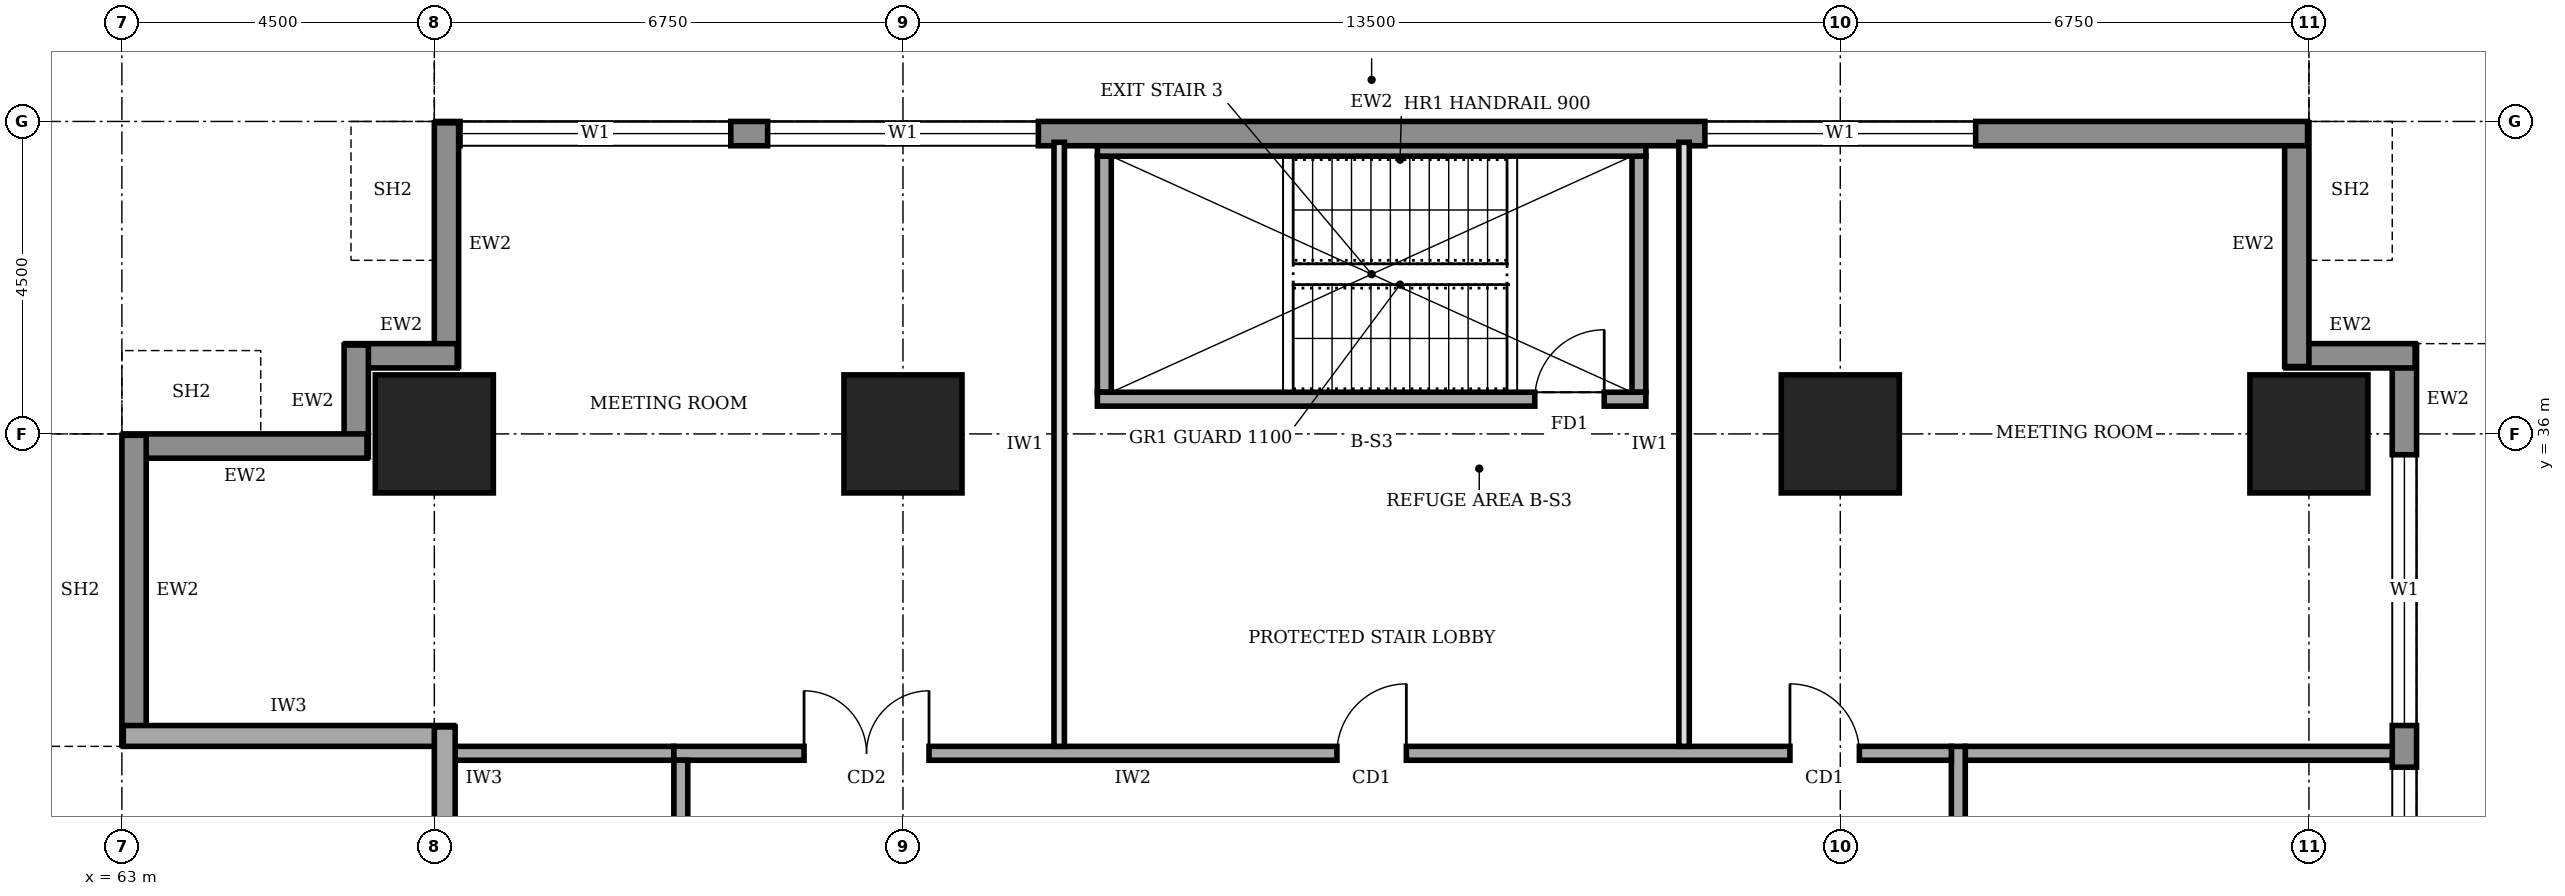
"""IFC4 building model, lengths in metres.
Left out: names, types, materials, properties, quantities, classifications, styles, units other than length and angle.
Written with IfcOpenShell. Run it as: python <this file> out.ifc"""

import sys

from ifc_helpers import new_model, si_unit, direction, frame, frame_2d, origin, origin_2d, place, context, subcontext, project, spatial, rectangle, extrude, element, fill, save


model = new_model("IFC4")
c1 = context("Model", 3, precision=1e-05, world=origin(), true_north=direction((0.0, 1.0)))
c2 = subcontext(c1, "Body", "Model", "MODEL_VIEW")
j1 = project(units=[si_unit("LENGTHUNIT", "METRE"), si_unit("PLANEANGLEUNIT", "RADIAN")], contexts=[c1])
p1 = place(None, origin())
s1 = spatial("IfcSite", under=j1, at=p1, CompositionType="ELEMENT")
p2 = place(p1, origin())
s2 = spatial("IfcBuilding", under=s1, at=p2, CompositionType="ELEMENT")
p3 = place(p2, frame((0.0, 0.0, 125.0)))
s3 = spatial("IfcBuildingStorey", under=s2, at=p3, CompositionType="ELEMENT", Elevation=125.0)
for number, where, z_axis, x_axis in (
    (1, (67.5, 36.0, 0.0), (0.0, 0.0, 1.0), (1.0, 0.0, 0.0)),
    (2, (74.25, 36.0, 0.0), (0.0, 0.0, 1.0), (1.0, 0.0, 0.0)),
    (3, (87.75, 36.0, 0.0), (0.0, 0.0, 1.0), (1.0, 0.0, 0.0)),
    (4, (94.5, 36.0, 0.0), (0.0, 0.0, 1.0), (1.0, 0.0, 0.0)),
):
    element("IfcColumn", number, at=place(p3, frame(where, z_axis=z_axis, x_axis=x_axis)), inside=s3, PredefinedType="COLUMN", context=c2, shape_type="SweptSolid", body=[
        extrude(rectangle(XDim=1.7, YDim=1.7, at=origin_2d()), origin(), (0.0, 0.0, 1.0), 4.0),
    ])
p4 = place(p3, frame((95.875, 3.32, 0.0), z_axis=(0.0, 0.0, 1.0), x_axis=(0.0, 1.0, 0.0)))
e5 = element("IfcWall", 5, at=p4, inside=s3, PredefinedType="STANDARD", context=c2, shape_type="SweptSolid", body=[
    extrude(rectangle(XDim=33.96, YDim=0.35, at=frame_2d((16.98, 0.0))), origin(), (0.0, 0.0, 1.0), 3.75),
])
p5 = place(p4, frame((1.48, 0.0, 0.9)))
e6 = element("IfcOpeningElement", 6, at=p5, cuts=e5, PredefinedType="OPENING", context=c2, shape_type="SweptSolid", body=[
    extrude(rectangle(XDim=3.9, YDim=2.2, at=frame_2d((1.95, 1.1))), frame((0.0, 0.185, 0.0), z_axis=(0.0, -1.0, 0.0), x_axis=(1.0, 0.0, 0.0)), (0.0, 0.0, 1.0), 0.37),
])
p6 = place(p4, frame((5.98, 0.0, 0.9)))
e7 = element("IfcOpeningElement", 7, at=p6, cuts=e5, PredefinedType="OPENING", context=c2, shape_type="SweptSolid", body=[
    extrude(rectangle(XDim=3.9, YDim=2.2, at=frame_2d((1.95, 1.1))), frame((0.0, 0.185, 0.0), z_axis=(0.0, -1.0, 0.0), x_axis=(1.0, 0.0, 0.0)), (0.0, 0.0, 1.0), 0.37),
])
p7 = place(p4, frame((10.48, 0.0, 0.9)))
e8 = element("IfcOpeningElement", 8, at=p7, cuts=e5, PredefinedType="OPENING", context=c2, shape_type="SweptSolid", body=[
    extrude(rectangle(XDim=3.9, YDim=2.2, at=frame_2d((1.95, 1.1))), frame((0.0, 0.185, 0.0), z_axis=(0.0, -1.0, 0.0), x_axis=(1.0, 0.0, 0.0)), (0.0, 0.0, 1.0), 0.37),
])
p8 = place(p4, frame((14.98, 0.0, 0.9)))
e9 = element("IfcOpeningElement", 9, at=p8, cuts=e5, PredefinedType="OPENING", context=c2, shape_type="SweptSolid", body=[
    extrude(rectangle(XDim=3.9, YDim=2.2, at=frame_2d((1.95, 1.1))), frame((0.0, 0.185, 0.0), z_axis=(0.0, -1.0, 0.0), x_axis=(1.0, 0.0, 0.0)), (0.0, 0.0, 1.0), 0.37),
])
p9 = place(p4, frame((19.48, 0.0, 0.9)))
e10 = element("IfcOpeningElement", 10, at=p9, cuts=e5, PredefinedType="OPENING", context=c2, shape_type="SweptSolid", body=[
    extrude(rectangle(XDim=3.9, YDim=2.2, at=frame_2d((1.95, 1.1))), frame((0.0, 0.185, 0.0), z_axis=(0.0, -1.0, 0.0), x_axis=(1.0, 0.0, 0.0)), (0.0, 0.0, 1.0), 0.37),
])
p10 = place(p4, frame((23.98, 0.0, 0.9)))
e11 = element("IfcOpeningElement", 11, at=p10, cuts=e5, PredefinedType="OPENING", context=c2, shape_type="SweptSolid", body=[
    extrude(rectangle(XDim=3.9, YDim=2.2, at=frame_2d((1.95, 1.1))), frame((0.0, 0.185, 0.0), z_axis=(0.0, -1.0, 0.0), x_axis=(1.0, 0.0, 0.0)), (0.0, 0.0, 1.0), 0.37),
])
p11 = place(p4, frame((28.48, 0.0, 0.9)))
e12 = element("IfcOpeningElement", 12, at=p11, cuts=e5, PredefinedType="OPENING", context=c2, shape_type="SweptSolid", body=[
    extrude(rectangle(XDim=3.9, YDim=2.2, at=frame_2d((1.95, 1.1))), frame((0.0, 0.185, 0.0), z_axis=(0.0, -1.0, 0.0), x_axis=(1.0, 0.0, 0.0)), (0.0, 0.0, 1.0), 0.37),
])
p12 = place(p3, frame((96.03, 37.125, 0.0), z_axis=(0.0, 0.0, 1.0), x_axis=(-1.0, 0.0, 0.0)))
e13 = element("IfcWall", 13, at=p12, inside=s3, PredefinedType="STANDARD", context=c2, shape_type="SweptSolid", body=[
    extrude(rectangle(XDim=1.86, YDim=0.35, at=frame_2d((0.93, 0.0))), origin(), (0.0, 0.0, 1.0), 3.75),
])
p13 = place(p3, frame((94.325, 36.97, 0.0), z_axis=(0.0, 0.0, 1.0), x_axis=(0.0, 1.0, 0.0)))
e14 = element("IfcWall", 14, at=p13, inside=s3, PredefinedType="STANDARD", context=c2, shape_type="SweptSolid", body=[
    extrude(rectangle(XDim=3.51, YDim=0.35, at=frame_2d((1.755, 0.0))), origin(), (0.0, 0.0, 1.0), 2.85),
])
p14 = place(p3, frame((94.48, 40.325, 0.0), z_axis=(0.0, 0.0, 1.0), x_axis=(-1.0, 0.0, 0.0)))
e15 = element("IfcWall", 15, at=p14, inside=s3, PredefinedType="STANDARD", context=c2, shape_type="SweptSolid", body=[
    extrude(rectangle(XDim=26.96, YDim=0.35, at=frame_2d((13.48, 0.0))), origin(), (0.0, 0.0, 1.0), 3.75),
])
p15 = place(p14, frame((22.71, 0.0, 0.9)))
e16 = element("IfcOpeningElement", 16, at=p15, cuts=e15, PredefinedType="OPENING", context=c2, shape_type="SweptSolid", body=[
    extrude(rectangle(XDim=3.9, YDim=2.2, at=frame_2d((1.95, 1.1))), frame((0.0, 0.185, 0.0), z_axis=(0.0, -1.0, 0.0), x_axis=(1.0, 0.0, 0.0)), (0.0, 0.0, 1.0), 0.37),
])
p16 = place(p14, frame((18.28, 0.0, 0.9)))
e17 = element("IfcOpeningElement", 17, at=p16, cuts=e15, PredefinedType="OPENING", context=c2, shape_type="SweptSolid", body=[
    extrude(rectangle(XDim=3.9, YDim=2.2, at=frame_2d((1.95, 1.1))), frame((0.0, 0.185, 0.0), z_axis=(0.0, -1.0, 0.0), x_axis=(1.0, 0.0, 0.0)), (0.0, 0.0, 1.0), 0.37),
])
p17 = place(p14, frame((4.78, 0.0, 0.9)))
e18 = element("IfcOpeningElement", 18, at=p17, cuts=e15, PredefinedType="OPENING", context=c2, shape_type="SweptSolid", body=[
    extrude(rectangle(XDim=3.9, YDim=2.2, at=frame_2d((1.95, 1.1))), frame((0.0, 0.185, 0.0), z_axis=(0.0, -1.0, 0.0), x_axis=(1.0, 0.0, 0.0)), (0.0, 0.0, 1.0), 0.37),
])
p18 = place(p3, frame((67.675, 40.48, 0.0), z_axis=(0.0, 0.0, 1.0), x_axis=(0.0, -1.0, 0.0)))
e19 = element("IfcWall", 19, at=p18, inside=s3, PredefinedType="STANDARD", context=c2, shape_type="SweptSolid", body=[
    extrude(rectangle(XDim=3.51, YDim=0.35, at=frame_2d((1.755, 0.0))), origin(), (0.0, 0.0, 1.0), 2.85),
])
for number, where, z_axis, x_axis in (
    (20, (67.83, 37.125, 0.0), (0.0, 0.0, 1.0), (-1.0, 0.0, 0.0)),
    (21, (66.375, 37.28, 0.0), (0.0, 0.0, 1.0), (0.0, -1.0, 0.0)),
):
    element("IfcWall", number, at=place(p3, frame(where, z_axis=z_axis, x_axis=x_axis)), inside=s3, PredefinedType="STANDARD", context=c2, shape_type="SweptSolid", body=[
        extrude(rectangle(XDim=1.61, YDim=0.35, at=frame_2d((0.805, 0.0))), origin(), (0.0, 0.0, 1.0), 3.75),
    ])
p19 = place(p3, frame((66.53, 35.825, 0.0), z_axis=(0.0, 0.0, 1.0), x_axis=(-1.0, 0.0, 0.0)))
e22 = element("IfcWall", 22, at=p19, inside=s3, PredefinedType="STANDARD", context=c2, shape_type="SweptSolid", body=[
    extrude(rectangle(XDim=3.51, YDim=0.35, at=frame_2d((1.755, 0.0))), origin(), (0.0, 0.0, 1.0), 2.85),
])
p20 = place(p3, frame((63.175, 35.98, 0.0), z_axis=(0.0, 0.0, 1.0), x_axis=(0.0, -1.0, 0.0)))
e23 = element("IfcWall", 23, at=p20, inside=s3, PredefinedType="STANDARD", context=c2, shape_type="SweptSolid", body=[
    extrude(rectangle(XDim=4.46, YDim=0.35, at=frame_2d((2.23, 0.0))), origin(), (0.0, 0.0, 1.0), 3.75),
])
p21 = place(p3, frame((63.02, 31.65, 0.0), z_axis=(0.0, 0.0, 1.0), x_axis=(1.0, 0.0, 0.0)))
e24 = element("IfcWall", 24, at=p21, inside=s3, PredefinedType="SOLIDWALL", context=c2, shape_type="SweptSolid", body=[
    extrude(rectangle(XDim=4.76, YDim=0.3, at=frame_2d((2.38, 0.0))), origin(), (0.0, 0.0, 1.0), 3.75),
])
p22 = place(p3, frame((67.65, 31.78, 0.0), z_axis=(0.0, 0.0, 1.0), x_axis=(0.0, -1.0, 0.0)))
e25 = element("IfcWall", 25, at=p22, inside=s3, PredefinedType="SOLIDWALL", context=c2, shape_type="SweptSolid", body=[
    extrude(rectangle(XDim=1.48, YDim=0.3, at=frame_2d((0.74, 0.0))), origin(), (0.0, 0.0, 1.0), 2.65),
])
p23 = place(p3, frame((89.45, 9.2, 0.0), z_axis=(0.0, 0.0, 1.0), x_axis=(0.0, 1.0, 0.0)))
e26 = element("IfcWall", 26, at=p23, inside=s3, PredefinedType="SOLIDWALL", context=c2, shape_type="SweptSolid", body=[
    extrude(rectangle(XDim=22.3, YDim=0.2, at=frame_2d((11.15, 0.0))), origin(), (0.0, 0.0, 1.0), 3.75),
])
p24 = place(p23, frame((1.625, 0.0, 0.0)))
e27 = element("IfcOpeningElement", 27, at=p24, cuts=e26, PredefinedType="OPENING", context=c2, shape_type="SweptSolid", body=[
    extrude(rectangle(XDim=1.0, YDim=2.1, at=frame_2d((0.5, 1.05))), frame((0.0, 0.11, 0.0), z_axis=(0.0, -1.0, 0.0), x_axis=(1.0, 0.0, 0.0)), (0.0, 0.0, 1.0), 0.22),
])
p25 = place(p23, frame((5.825, 0.0, 0.0)))
e28 = element("IfcOpeningElement", 28, at=p25, cuts=e26, PredefinedType="OPENING", context=c2, shape_type="SweptSolid", body=[
    extrude(rectangle(XDim=0.9, YDim=2.1, at=frame_2d((0.45, 1.05))), frame((0.0, 0.11, 0.0), z_axis=(0.0, -1.0, 0.0), x_axis=(1.0, 0.0, 0.0)), (0.0, 0.0, 1.0), 0.22),
])
p26 = place(p23, frame((8.75, 0.0, 0.0)))
e29 = element("IfcOpeningElement", 29, at=p26, cuts=e26, PredefinedType="OPENING", context=c2, shape_type="SweptSolid", body=[
    extrude(rectangle(XDim=0.9, YDim=2.1, at=frame_2d((0.45, 1.05))), frame((0.0, 0.11, 0.0), z_axis=(0.0, -1.0, 0.0), x_axis=(1.0, 0.0, 0.0)), (0.0, 0.0, 1.0), 0.22),
])
p27 = place(p23, frame((13.525, 0.0, 0.0)))
e30 = element("IfcOpeningElement", 30, at=p27, cuts=e26, PredefinedType="OPENING", context=c2, shape_type="SweptSolid", body=[
    extrude(rectangle(XDim=0.9, YDim=2.1, at=frame_2d((0.45, 1.05))), frame((0.0, 0.11, 0.0), z_axis=(0.0, -1.0, 0.0), x_axis=(1.0, 0.0, 0.0)), (0.0, 0.0, 1.0), 0.22),
])
p28 = place(p23, frame((16.15, 0.0, 0.0)))
e31 = element("IfcOpeningElement", 31, at=p28, cuts=e26, PredefinedType="OPENING", context=c2, shape_type="SweptSolid", body=[
    extrude(rectangle(XDim=1.0, YDim=2.1, at=frame_2d((0.5, 1.05))), frame((0.0, 0.11, 0.0), z_axis=(0.0, -1.0, 0.0), x_axis=(1.0, 0.0, 0.0)), (0.0, 0.0, 1.0), 0.22),
])
p29 = place(p23, frame((10.8, 0.0, 0.0)))
e32 = element("IfcOpeningElement", 32, at=p29, cuts=e26, PredefinedType="OPENING", context=c2, shape_type="SweptSolid", body=[
    extrude(rectangle(XDim=1.0, YDim=2.1, at=frame_2d((0.5, 1.05))), frame((0.0, 0.11, 0.0), z_axis=(0.0, -1.0, 0.0), x_axis=(1.0, 0.0, 0.0)), (0.0, 0.0, 1.0), 0.22),
])
p30 = place(p23, frame((19.475, 0.0, 0.0)))
e33 = element("IfcOpeningElement", 33, at=p30, cuts=e26, PredefinedType="OPENING", context=c2, shape_type="SweptSolid", body=[
    extrude(rectangle(XDim=1.0, YDim=2.1, at=frame_2d((0.5, 1.05))), frame((0.0, 0.11, 0.0), z_axis=(0.0, -1.0, 0.0), x_axis=(1.0, 0.0, 0.0)), (0.0, 0.0, 1.0), 0.22),
])
p31 = place(p3, frame((89.35, 31.4, 0.0), z_axis=(0.0, 0.0, 1.0), x_axis=(-1.0, 0.0, 0.0)))
e34 = element("IfcWall", 34, at=p31, inside=s3, PredefinedType="SOLIDWALL", context=c2, shape_type="SweptSolid", body=[
    extrude(rectangle(XDim=18.4, YDim=0.2, at=frame_2d((9.2, 0.0))), origin(), (0.0, 0.0, 1.0), 3.75),
])
p32 = place(p31, frame((14.725, 0.0, 0.0)))
e35 = element("IfcOpeningElement", 35, at=p32, cuts=e34, PredefinedType="OPENING", context=c2, shape_type="SweptSolid", body=[
    extrude(rectangle(XDim=1.8, YDim=2.1, at=frame_2d((0.9, 1.05))), frame((0.0, 0.11, 0.0), z_axis=(0.0, -1.0, 0.0), x_axis=(1.0, 0.0, 0.0)), (0.0, 0.0, 1.0), 0.22),
])
p33 = place(p31, frame((7.85, 0.0, 0.0)))
e36 = element("IfcOpeningElement", 36, at=p33, cuts=e34, PredefinedType="OPENING", context=c2, shape_type="SweptSolid", body=[
    extrude(rectangle(XDim=1.0, YDim=2.1, at=frame_2d((0.5, 1.05))), frame((0.0, 0.11, 0.0), z_axis=(0.0, -1.0, 0.0), x_axis=(1.0, 0.0, 0.0)), (0.0, 0.0, 1.0), 0.22),
])
p34 = place(p31, frame((1.325, 0.0, 0.0)))
e37 = element("IfcOpeningElement", 37, at=p34, cuts=e34, PredefinedType="OPENING", context=c2, shape_type="SweptSolid", body=[
    extrude(rectangle(XDim=1.0, YDim=2.1, at=frame_2d((0.5, 1.05))), frame((0.0, 0.11, 0.0), z_axis=(0.0, -1.0, 0.0), x_axis=(1.0, 0.0, 0.0)), (0.0, 0.0, 1.0), 0.22),
])
p35 = place(p3, frame((71.05, 31.3, 0.0), z_axis=(0.0, 0.0, 1.0), x_axis=(0.0, -1.0, 0.0)))
e38 = element("IfcWall", 38, at=p35, inside=s3, PredefinedType="SOLIDWALL", context=c2, shape_type="SweptSolid", body=[
    extrude(rectangle(XDim=22.3, YDim=0.2, at=frame_2d((11.15, 0.0))), origin(), (0.0, 0.0, 1.0), 3.75),
])
p36 = place(p35, frame((10.15, 0.0, 0.0)))
e39 = element("IfcOpeningElement", 39, at=p36, cuts=e38, PredefinedType="OPENING", context=c2, shape_type="SweptSolid", body=[
    extrude(rectangle(XDim=1.8, YDim=2.1, at=frame_2d((0.9, 1.05))), frame((0.0, 0.11, 0.0), z_axis=(0.0, -1.0, 0.0), x_axis=(1.0, 0.0, 0.0)), (0.0, 0.0, 1.0), 0.22),
])
p37 = place(p3, frame((67.8, 31.4, 0.0), z_axis=(0.0, 0.0, 1.0), x_axis=(1.0, 0.0, 0.0)))
e40 = element("IfcWall", 40, at=p37, inside=s3, PredefinedType="SOLIDWALL", context=c2, shape_type="SweptSolid", body=[
    extrude(rectangle(XDim=3.15, YDim=0.2, at=frame_2d((1.575, 0.0))), origin(), (0.0, 0.0, 1.0), 3.75),
])
p38 = place(p3, frame((89.55, 31.4, 0.0), z_axis=(0.0, 0.0, 1.0), x_axis=(1.0, 0.0, 0.0)))
e41 = element("IfcWall", 41, at=p38, inside=s3, PredefinedType="SOLIDWALL", context=c2, shape_type="SweptSolid", body=[
    extrude(rectangle(XDim=6.2, YDim=0.2, at=frame_2d((3.1, 0.0))), origin(), (0.0, 0.0, 1.0), 3.75),
])
for number, where, z_axis, x_axis in (
    (42, (76.5, 31.5, 0.0), (0.0, 0.0, 1.0), (0.0, 1.0, 0.0)),
    (43, (85.5, 31.5, 0.0), (0.0, 0.0, 1.0), (0.0, 1.0, 0.0)),
):
    element("IfcWall", number, at=place(p3, frame(where, z_axis=z_axis, x_axis=x_axis)), inside=s3, PredefinedType="PARTITIONING", context=c2, shape_type="SweptSolid", body=[
        extrude(rectangle(XDim=8.7, YDim=0.15, at=frame_2d((4.35, 0.0))), origin(), (0.0, 0.0, 1.0), 3.75),
    ])
p39 = place(p3, frame((77.05, 36.5, 0.0), z_axis=(0.0, 0.0, 1.0), x_axis=(1.0, 0.0, 0.0)))
e44 = element("IfcWall", 44, at=p39, inside=s3, PredefinedType="SOLIDWALL", context=c2, shape_type="SweptSolid", body=[
    extrude(rectangle(XDim=7.9, YDim=0.2, at=frame_2d((3.95, 0.0))), origin(), (0.0, 0.0, 1.0), 3.75),
])
p40 = place(p39, frame((6.3, 0.0, 0.0)))
e45 = element("IfcOpeningElement", 45, at=p40, cuts=e44, PredefinedType="OPENING", context=c2, shape_type="SweptSolid", body=[
    extrude(rectangle(XDim=1.0, YDim=2.1, at=frame_2d((0.5, 1.05))), frame((0.0, 0.11, 0.0), z_axis=(0.0, -1.0, 0.0), x_axis=(1.0, 0.0, 0.0)), (0.0, 0.0, 1.0), 0.22),
])
p41 = place(p3, frame((77.05, 40.075, 0.0), z_axis=(0.0, 0.0, 1.0), x_axis=(1.0, 0.0, 0.0)))
e46 = element("IfcWall", 46, at=p41, inside=s3, PredefinedType="SOLIDWALL", context=c2, shape_type="SweptSolid", body=[
    extrude(rectangle(XDim=7.9, YDim=0.15, at=frame_2d((3.95, 0.0))), origin(), (0.0, 0.0, 1.0), 3.75),
])
for number, where, z_axis, x_axis in (
    (47, (77.15, 36.6, 0.0), (0.0, 0.0, 1.0), (0.0, 1.0, 0.0)),
    (48, (84.85, 36.6, 0.0), (0.0, 0.0, 1.0), (0.0, 1.0, 0.0)),
):
    element("IfcWall", number, at=place(p3, frame(where, z_axis=z_axis, x_axis=x_axis)), inside=s3, PredefinedType="SOLIDWALL", context=c2, shape_type="SweptSolid", body=[
        extrude(rectangle(XDim=3.4, YDim=0.2, at=frame_2d((1.7, 0.0))), origin(), (0.0, 0.0, 1.0), 3.75),
    ])
p42 = place(p10, origin())
e49 = element("IfcWindow", 49, at=p42, inside=s3, PartitioningType="SINGLE_PANEL", PredefinedType="WINDOW", context=c2, shape_type="SweptSolid", body=[
    extrude(rectangle(XDim=3.9, YDim=2.2, at=frame_2d((1.95, 1.1))), frame((0.0, 0.03, 0.0), z_axis=(0.0, -1.0, 0.0), x_axis=(1.0, 0.0, 0.0)), (0.0, 0.0, 1.0), 0.06),
])
fill(e11, e49)
p43 = place(p11, origin())
e50 = element("IfcWindow", 50, at=p43, inside=s3, PartitioningType="SINGLE_PANEL", PredefinedType="WINDOW", context=c2, shape_type="SweptSolid", body=[
    extrude(rectangle(XDim=3.9, YDim=2.2, at=frame_2d((1.95, 1.1))), frame((0.0, 0.03, 0.0), z_axis=(0.0, -1.0, 0.0), x_axis=(1.0, 0.0, 0.0)), (0.0, 0.0, 1.0), 0.06),
])
fill(e12, e50)
p44 = place(p15, origin())
e51 = element("IfcWindow", 51, at=p44, inside=s3, PartitioningType="SINGLE_PANEL", PredefinedType="WINDOW", context=c2, shape_type="SweptSolid", body=[
    extrude(rectangle(XDim=3.9, YDim=2.2, at=frame_2d((1.95, 1.1))), frame((0.0, 0.03, 0.0), z_axis=(0.0, -1.0, 0.0), x_axis=(1.0, 0.0, 0.0)), (0.0, 0.0, 1.0), 0.06),
])
fill(e16, e51)
p45 = place(p16, origin())
e52 = element("IfcWindow", 52, at=p45, inside=s3, PartitioningType="SINGLE_PANEL", PredefinedType="WINDOW", context=c2, shape_type="SweptSolid", body=[
    extrude(rectangle(XDim=3.9, YDim=2.2, at=frame_2d((1.95, 1.1))), frame((0.0, 0.03, 0.0), z_axis=(0.0, -1.0, 0.0), x_axis=(1.0, 0.0, 0.0)), (0.0, 0.0, 1.0), 0.06),
])
fill(e17, e52)
p46 = place(p17, origin())
e53 = element("IfcWindow", 53, at=p46, inside=s3, PartitioningType="SINGLE_PANEL", PredefinedType="WINDOW", context=c2, shape_type="SweptSolid", body=[
    extrude(rectangle(XDim=3.9, YDim=2.2, at=frame_2d((1.95, 1.1))), frame((0.0, 0.03, 0.0), z_axis=(0.0, -1.0, 0.0), x_axis=(1.0, 0.0, 0.0)), (0.0, 0.0, 1.0), 0.06),
])
fill(e18, e53)
p47 = place(p32, frame((1.8, 0.0, 0.0), z_axis=(0.0, 0.0, 1.0), x_axis=(-1.0, 0.0, 0.0)))
e54 = element("IfcDoor", 54, at=p47, inside=s3, OperationType="DOUBLE_DOOR_SINGLE_SWING", PredefinedType="DOOR", context=c2, shape_type="SweptSolid", body=[
    extrude(rectangle(XDim=1.8, YDim=2.1, at=frame_2d((0.9, 1.05))), frame((0.0, 0.025, 0.0), z_axis=(0.0, -1.0, 0.0), x_axis=(1.0, 0.0, 0.0)), (0.0, 0.0, 1.0), 0.05),
])
fill(e35, e54)
p48 = place(p33, frame((1.0, 0.0, 0.0), z_axis=(0.0, 0.0, 1.0), x_axis=(-1.0, 0.0, 0.0)))
e55 = element("IfcDoor", 55, at=p48, inside=s3, OperationType="SINGLE_SWING_RIGHT", PredefinedType="DOOR", context=c2, shape_type="SweptSolid", body=[
    extrude(rectangle(XDim=1.0, YDim=2.1, at=frame_2d((0.5, 1.05))), frame((0.0, 0.025, 0.0), z_axis=(0.0, -1.0, 0.0), x_axis=(1.0, 0.0, 0.0)), (0.0, 0.0, 1.0), 0.05),
])
fill(e36, e55)
p49 = place(p34, frame((1.0, 0.0, 0.0), z_axis=(0.0, 0.0, 1.0), x_axis=(-1.0, 0.0, 0.0)))
e56 = element("IfcDoor", 56, at=p49, inside=s3, OperationType="SINGLE_SWING_LEFT", PredefinedType="DOOR", context=c2, shape_type="SweptSolid", body=[
    extrude(rectangle(XDim=1.0, YDim=2.1, at=frame_2d((0.5, 1.05))), frame((0.0, 0.025, 0.0), z_axis=(0.0, -1.0, 0.0), x_axis=(1.0, 0.0, 0.0)), (0.0, 0.0, 1.0), 0.05),
])
fill(e37, e56)
p50 = place(p40, origin())
e57 = element("IfcDoor", 57, at=p50, inside=s3, OperationType="SINGLE_SWING_RIGHT", PredefinedType="DOOR", context=c2, shape_type="SweptSolid", body=[
    extrude(rectangle(XDim=1.0, YDim=2.1, at=frame_2d((0.5, 1.05))), frame((0.0, 0.025, 0.0), z_axis=(0.0, -1.0, 0.0), x_axis=(1.0, 0.0, 0.0)), (0.0, 0.0, 1.0), 0.05),
])
fill(e45, e57)
save(model, sys.argv[1])
